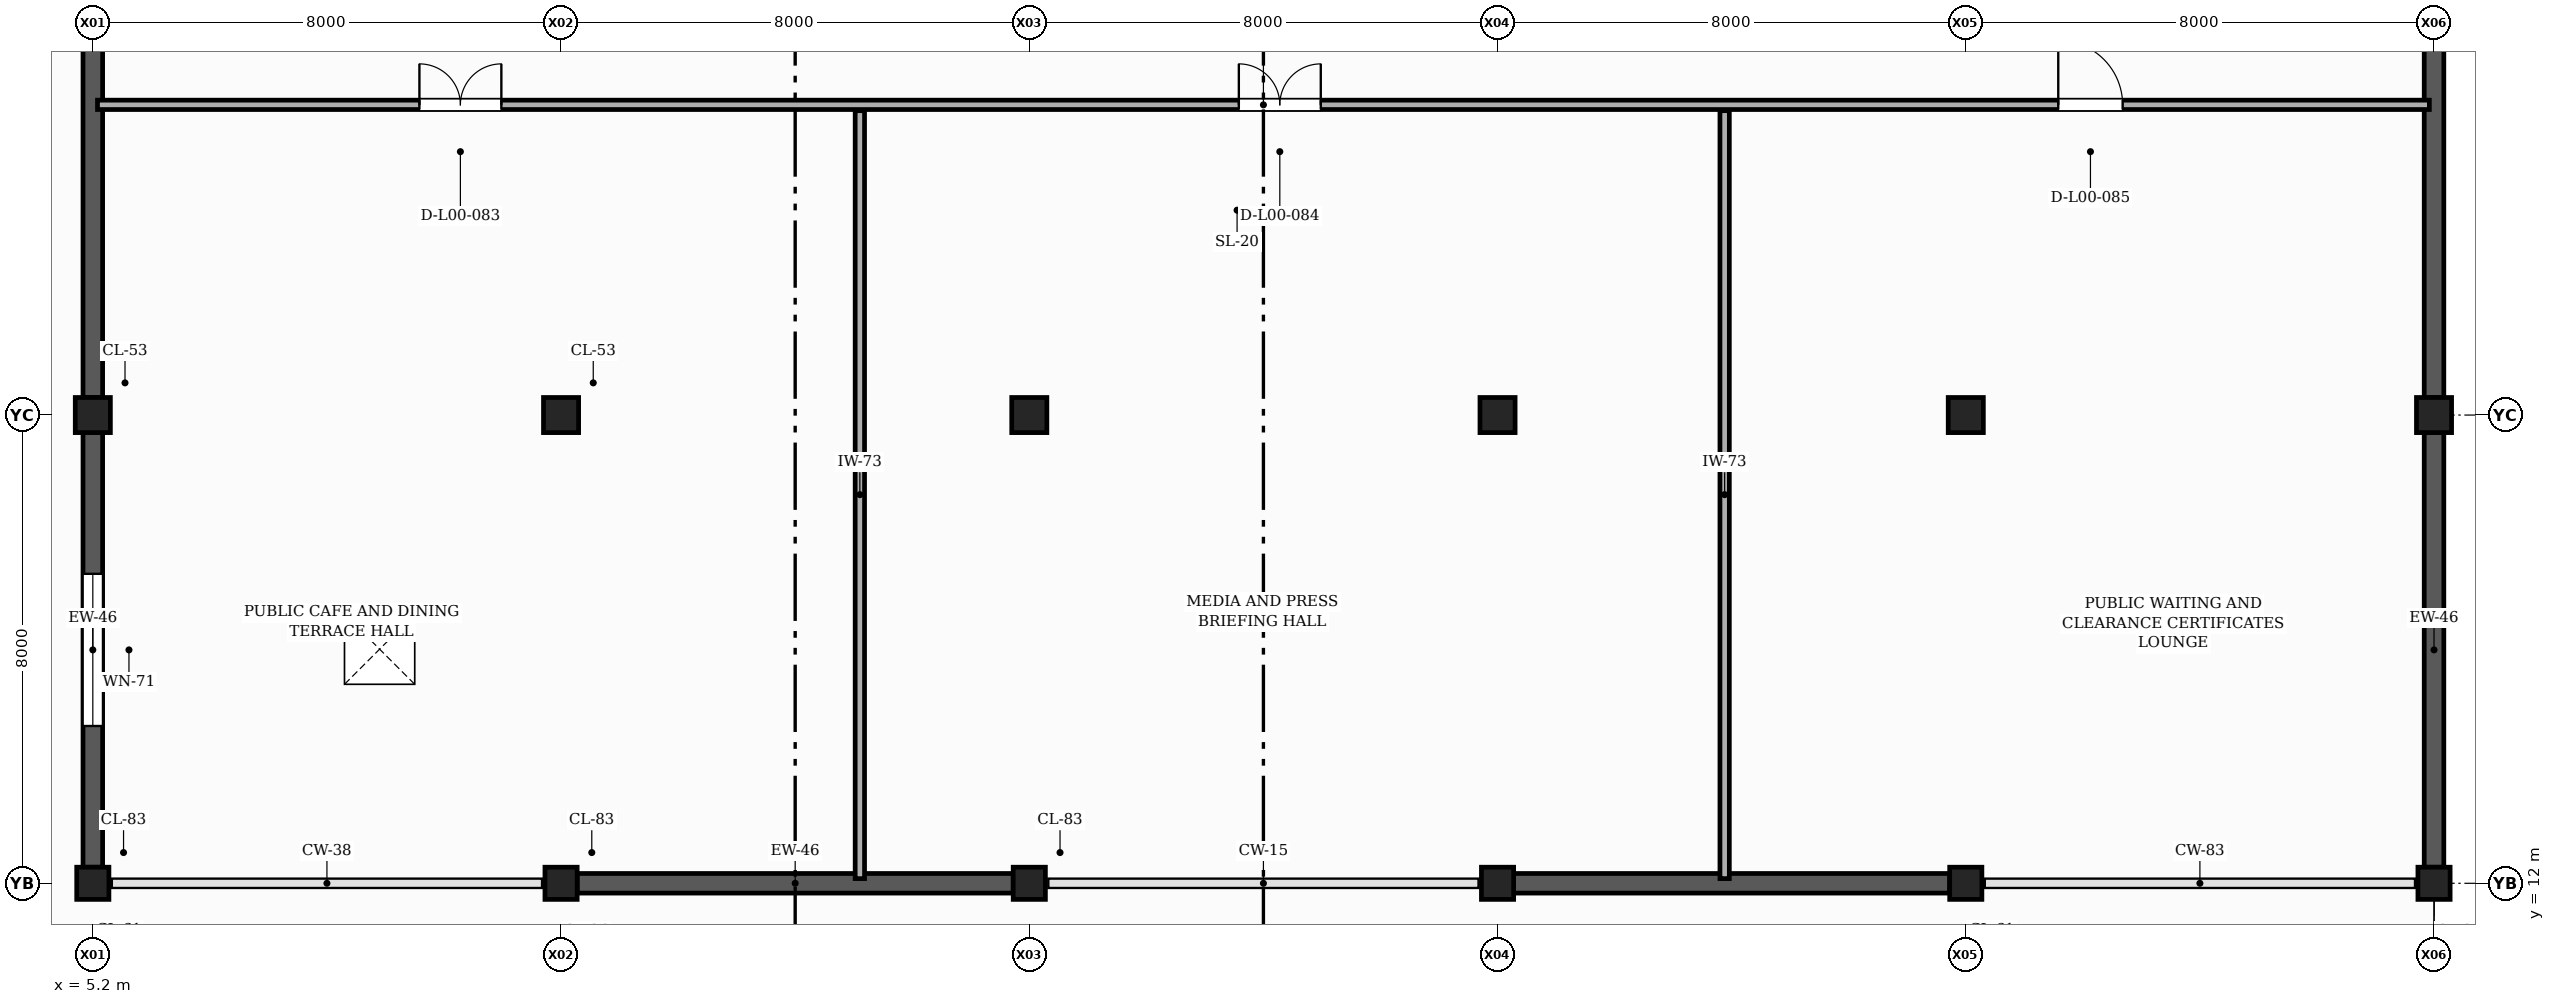
"""IFC4 building model, lengths in metres.
Left out: names, types, materials, properties, quantities, classifications, styles, units other than length and angle.
Written with IfcOpenShell. Run it as: python <this file> out.ifc"""

import sys

from ifc_helpers import new_model, si_unit, direction, frame, frame_2d, origin, origin_2d, place, context, subcontext, project, spatial, rectangle, extrude, element, fill, save


model = new_model("IFC4")
c1 = context("Model", 3, precision=1e-05, world=origin(), true_north=direction((0.0, 1.0)))
c2 = subcontext(c1, "Body", "Model", "MODEL_VIEW")
j1 = project(units=[si_unit("LENGTHUNIT", "METRE"), si_unit("PLANEANGLEUNIT", "RADIAN")], contexts=[c1])
p1 = place(None, origin())
s1 = spatial("IfcSite", under=j1, at=p1, CompositionType="ELEMENT")
p2 = place(p1, origin())
s2 = spatial("IfcBuilding", under=s1, at=p2, CompositionType="ELEMENT")
p3 = place(p2, origin())
s3 = spatial("IfcBuildingStorey", under=s2, at=p3, CompositionType="ELEMENT", Elevation=0.0)
p4 = place(p3, frame((5.2, 12.0, -0.5), z_axis=(0.0, 0.0, 1.0), x_axis=(1.0, 0.0, 0.0)))
e1 = element("IfcColumn", 1, at=p4, inside=s3, PredefinedType="COLUMN", context=c2, shape_type="SweptSolid", body=[
    extrude(rectangle(XDim=0.55, YDim=0.55, at=origin_2d()), origin(), (0.0, 0.0, 1.0), 5.3),
])
p5 = place(p3, frame((5.2, 20.0, -0.5), z_axis=(0.0, 0.0, 1.0), x_axis=(1.0, 0.0, 0.0)))
e2 = element("IfcColumn", 2, at=p5, inside=s3, PredefinedType="COLUMN", context=c2, shape_type="SweptSolid", body=[
    extrude(rectangle(XDim=0.6, YDim=0.6, at=origin_2d()), origin(), (0.0, 0.0, 1.0), 5.3),
])
p6 = place(p3, frame((13.2, 12.0, -0.5), z_axis=(0.0, 0.0, 1.0), x_axis=(1.0, 0.0, 0.0)))
e3 = element("IfcColumn", 3, at=p6, inside=s3, PredefinedType="COLUMN", context=c2, shape_type="SweptSolid", body=[
    extrude(rectangle(XDim=0.55, YDim=0.55, at=origin_2d()), origin(), (0.0, 0.0, 1.0), 5.3),
])
p7 = place(p3, frame((13.2, 20.0, -0.5), z_axis=(0.0, 0.0, 1.0), x_axis=(1.0, 0.0, 0.0)))
e4 = element("IfcColumn", 4, at=p7, inside=s3, PredefinedType="COLUMN", context=c2, shape_type="SweptSolid", body=[
    extrude(rectangle(XDim=0.6, YDim=0.6, at=origin_2d()), origin(), (0.0, 0.0, 1.0), 5.3),
])
p8 = place(p3, frame((21.2, 12.0, -0.5), z_axis=(0.0, 0.0, 1.0), x_axis=(1.0, 0.0, 0.0)))
e5 = element("IfcColumn", 5, at=p8, inside=s3, PredefinedType="COLUMN", context=c2, shape_type="SweptSolid", body=[
    extrude(rectangle(XDim=0.55, YDim=0.55, at=origin_2d()), origin(), (0.0, 0.0, 1.0), 5.3),
])
p9 = place(p3, frame((21.2, 20.0, -0.5), z_axis=(0.0, 0.0, 1.0), x_axis=(1.0, 0.0, 0.0)))
e6 = element("IfcColumn", 6, at=p9, inside=s3, PredefinedType="COLUMN", context=c2, shape_type="SweptSolid", body=[
    extrude(rectangle(XDim=0.6, YDim=0.6, at=origin_2d()), origin(), (0.0, 0.0, 1.0), 5.3),
])
p10 = place(p3, frame((29.2, 12.0, -0.5), z_axis=(0.0, 0.0, 1.0), x_axis=(1.0, 0.0, 0.0)))
e7 = element("IfcColumn", 7, at=p10, inside=s3, PredefinedType="COLUMN", context=c2, shape_type="SweptSolid", body=[
    extrude(rectangle(XDim=0.55, YDim=0.55, at=origin_2d()), origin(), (0.0, 0.0, 1.0), 5.3),
])
p11 = place(p3, frame((29.2, 20.0, -0.5), z_axis=(0.0, 0.0, 1.0), x_axis=(1.0, 0.0, 0.0)))
e8 = element("IfcColumn", 8, at=p11, inside=s3, PredefinedType="COLUMN", context=c2, shape_type="SweptSolid", body=[
    extrude(rectangle(XDim=0.6, YDim=0.6, at=origin_2d()), origin(), (0.0, 0.0, 1.0), 5.3),
])
p12 = place(p3, frame((37.2, 12.0, -0.5), z_axis=(0.0, 0.0, 1.0), x_axis=(1.0, 0.0, 0.0)))
e9 = element("IfcColumn", 9, at=p12, inside=s3, PredefinedType="COLUMN", context=c2, shape_type="SweptSolid", body=[
    extrude(rectangle(XDim=0.55, YDim=0.55, at=origin_2d()), origin(), (0.0, 0.0, 1.0), 5.3),
])
p13 = place(p3, frame((37.2, 20.0, -0.5), z_axis=(0.0, 0.0, 1.0), x_axis=(1.0, 0.0, 0.0)))
e10 = element("IfcColumn", 10, at=p13, inside=s3, PredefinedType="COLUMN", context=c2, shape_type="SweptSolid", body=[
    extrude(rectangle(XDim=0.6, YDim=0.6, at=origin_2d()), origin(), (0.0, 0.0, 1.0), 5.3),
])
p14 = place(p3, frame((45.2, 12.0, -0.5), z_axis=(0.0, 0.0, 1.0), x_axis=(1.0, 0.0, 0.0)))
e11 = element("IfcColumn", 11, at=p14, inside=s3, PredefinedType="COLUMN", context=c2, shape_type="SweptSolid", body=[
    extrude(rectangle(XDim=0.55, YDim=0.55, at=origin_2d()), origin(), (0.0, 0.0, 1.0), 5.3),
])
p15 = place(p3, frame((45.2, 20.0, -0.5), z_axis=(0.0, 0.0, 1.0), x_axis=(1.0, 0.0, 0.0)))
e12 = element("IfcColumn", 12, at=p15, inside=s3, PredefinedType="COLUMN", context=c2, shape_type="SweptSolid", body=[
    extrude(rectangle(XDim=0.6, YDim=0.6, at=origin_2d()), origin(), (0.0, 0.0, 1.0), 5.3),
])
for number, where, z_axis, x_axis in (
    (13, (13.475, 12.0, -0.42), (0.0, 0.0, 1.0), (1.0, 0.0, 0.0)),
    (14, (29.475, 12.0, -0.42), (0.0, 0.0, 1.0), (1.0, 0.0, 0.0)),
):
    element("IfcWall", number, at=place(p3, frame(where, z_axis=z_axis, x_axis=x_axis)), inside=s3, PredefinedType="SOLIDWALL", context=c2, shape_type="SweptSolid", body=[
        extrude(rectangle(XDim=7.45, YDim=0.335, at=frame_2d((3.725, 0.0))), origin(), (0.0, 0.0, 1.0), 4.2),
    ])
p16 = place(p3, frame((45.2, 12.275, -0.42), z_axis=(0.0, 0.0, 1.0), x_axis=(0.0, 1.0, 0.0)))
e15 = element("IfcWall", 15, at=p16, inside=s3, PredefinedType="SOLIDWALL", context=c2, shape_type="SweptSolid", body=[
    extrude(rectangle(XDim=7.425, YDim=0.335, at=frame_2d((3.712, 0.0))), origin(), (0.0, 0.0, 1.0), 4.3),
])
for number, where, z_axis, x_axis in (
    (16, (45.2, 20.3, -0.42), (0.0, 0.0, 1.0), (0.0, 1.0, 0.0)),
    (17, (5.2, 27.7, -0.42), (0.0, 0.0, 1.0), (0.0, -1.0, 0.0)),
):
    element("IfcWall", number, at=place(p3, frame(where, z_axis=z_axis, x_axis=x_axis)), inside=s3, PredefinedType="SOLIDWALL", context=c2, shape_type="SweptSolid", body=[
        extrude(rectangle(XDim=7.4, YDim=0.335, at=frame_2d((3.7, 0.0))), origin(), (0.0, 0.0, 1.0), 4.3),
    ])
p17 = place(p3, frame((5.2, 19.7, -0.42), z_axis=(0.0, 0.0, 1.0), x_axis=(0.0, -1.0, 0.0)))
e18 = element("IfcWall", 18, at=p17, inside=s3, PredefinedType="SOLIDWALL", context=c2, shape_type="SweptSolid", body=[
    extrude(rectangle(XDim=7.425, YDim=0.335, at=frame_2d((3.712, 0.0))), origin(), (0.0, 0.0, 1.0), 4.3),
])
p18 = place(p17, frame((2.413, 0.0, 1.32)))
e19 = element("IfcOpeningElement", 19, at=p18, cuts=e18, PredefinedType="OPENING", context=c2, shape_type="SweptSolid", body=[
    extrude(rectangle(XDim=2.6, YDim=1.8, at=frame_2d((1.3, 0.9))), frame((0.0, 0.177, 0.0), z_axis=(0.0, -1.0, 0.0), x_axis=(1.0, 0.0, 0.0)), (0.0, 0.0, 1.0), 0.355),
])
for number, where, z_axis, x_axis in (
    (20, (18.305, 12.08, 0.0), (0.0, 0.0, 1.0), (0.0, 1.0, 0.0)),
    (21, (33.08, 12.08, 0.0), (0.0, 0.0, 1.0), (0.0, 1.0, 0.0)),
):
    element("IfcWall", number, at=place(p3, frame(where, z_axis=z_axis, x_axis=x_axis)), inside=s3, PredefinedType="PARTITIONING", context=c2, shape_type="SweptSolid", body=[
        extrude(rectangle(XDim=13.12, YDim=0.16, at=frame_2d((6.56, 0.0))), origin(), (0.0, 0.0, 1.0), 3.765),
    ])
p19 = place(p3, frame((5.28, 25.3, 0.0), z_axis=(0.0, 0.0, 1.0), x_axis=(1.0, 0.0, 0.0)))
e22 = element("IfcWall", 22, at=p19, inside=s3, PredefinedType="PARTITIONING", context=c2, shape_type="SweptSolid", body=[
    extrude(rectangle(XDim=39.84, YDim=0.16, at=frame_2d((19.92, 0.0))), origin(), (0.0, 0.0, 1.0), 3.865),
])
p20 = place(p19, frame((5.5, 0.0, 0.0)))
e23 = element("IfcOpeningElement", 23, at=p20, cuts=e22, PredefinedType="OPENING", context=c2, shape_type="SweptSolid", body=[
    extrude(rectangle(XDim=1.4, YDim=2.15, at=frame_2d((0.7, 1.075))), frame((0.0, 0.09, 0.0), z_axis=(0.0, -1.0, 0.0), x_axis=(1.0, 0.0, 0.0)), (0.0, 0.0, 1.0), 0.18),
])
p21 = place(p19, frame((19.5, 0.0, 0.0)))
e24 = element("IfcOpeningElement", 24, at=p21, cuts=e22, PredefinedType="OPENING", context=c2, shape_type="SweptSolid", body=[
    extrude(rectangle(XDim=1.4, YDim=2.15, at=frame_2d((0.7, 1.075))), frame((0.0, 0.09, 0.0), z_axis=(0.0, -1.0, 0.0), x_axis=(1.0, 0.0, 0.0)), (0.0, 0.0, 1.0), 0.18),
])
p22 = place(p19, frame((33.5, 0.0, 0.0)))
e25 = element("IfcOpeningElement", 25, at=p22, cuts=e22, PredefinedType="OPENING", context=c2, shape_type="SweptSolid", body=[
    extrude(rectangle(XDim=1.1, YDim=2.1, at=frame_2d((0.55, 1.05))), frame((0.0, 0.09, 0.0), z_axis=(0.0, -1.0, 0.0), x_axis=(1.0, 0.0, 0.0)), (0.0, 0.0, 1.0), 0.18),
])
p23 = place(p18, origin())
e26 = element("IfcWindow", 26, at=p23, inside=s3, PartitioningType="SINGLE_PANEL", PredefinedType="WINDOW", context=c2, shape_type="SweptSolid", body=[
    extrude(rectangle(XDim=2.6, YDim=1.8, at=frame_2d((1.3, 0.9))), frame((0.0, 0.03, 0.0), z_axis=(0.0, -1.0, 0.0), x_axis=(1.0, 0.0, 0.0)), (0.0, 0.0, 1.0), 0.06),
])
fill(e19, e26)
p24 = place(p20, origin())
e27 = element("IfcDoor", 27, at=p24, inside=s3, OperationType="DOUBLE_DOOR_SINGLE_SWING", PredefinedType="DOOR", context=c2, shape_type="SweptSolid", body=[
    extrude(rectangle(XDim=1.4, YDim=2.15, at=frame_2d((0.7, 1.075))), frame((0.0, 0.025, 0.0), z_axis=(0.0, -1.0, 0.0), x_axis=(1.0, 0.0, 0.0)), (0.0, 0.0, 1.0), 0.05),
])
fill(e23, e27)
p25 = place(p21, origin())
e28 = element("IfcDoor", 28, at=p25, inside=s3, OperationType="DOUBLE_DOOR_SINGLE_SWING", PredefinedType="DOOR", context=c2, shape_type="SweptSolid", body=[
    extrude(rectangle(XDim=1.4, YDim=2.15, at=frame_2d((0.7, 1.075))), frame((0.0, 0.025, 0.0), z_axis=(0.0, -1.0, 0.0), x_axis=(1.0, 0.0, 0.0)), (0.0, 0.0, 1.0), 0.05),
])
fill(e24, e28)
p26 = place(p22, origin())
e29 = element("IfcDoor", 29, at=p26, inside=s3, OperationType="SINGLE_SWING_LEFT", PredefinedType="DOOR", context=c2, shape_type="SweptSolid", body=[
    extrude(rectangle(XDim=1.1, YDim=2.1, at=frame_2d((0.55, 1.05))), frame((0.0, 0.025, 0.0), z_axis=(0.0, -1.0, 0.0), x_axis=(1.0, 0.0, 0.0)), (0.0, 0.0, 1.0), 0.05),
])
fill(e25, e29)
save(model, sys.argv[1])
